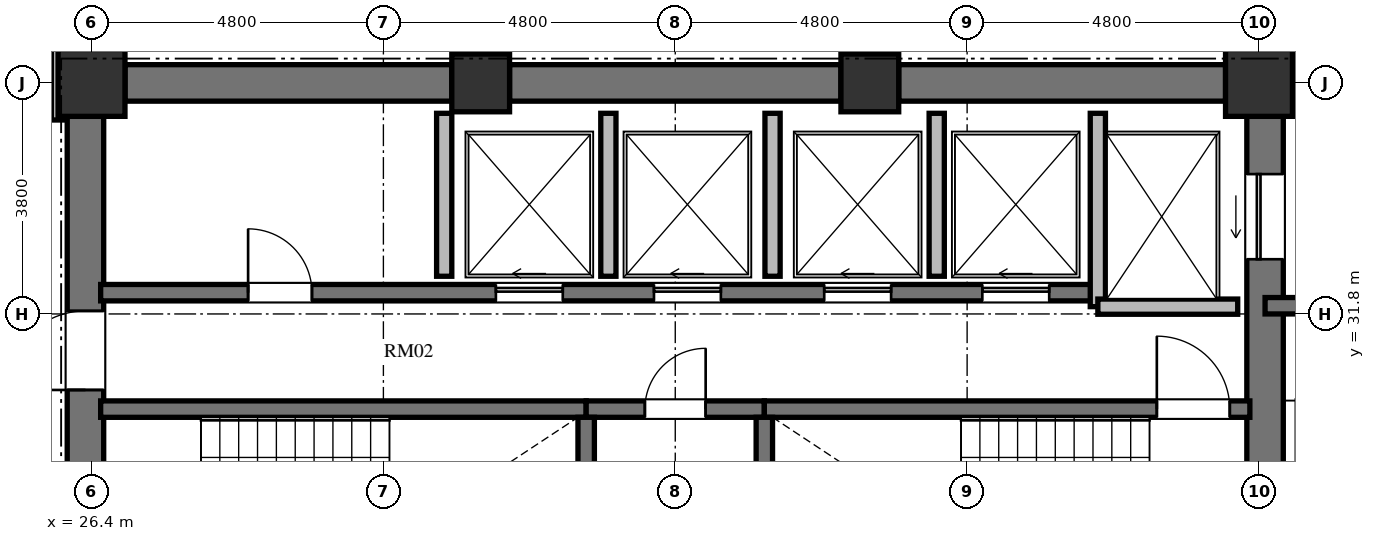
"""IFC4 building model, lengths in metres.
Left out: names, types, materials, properties, quantities, classifications, styles, units other than length and angle.
Written with IfcOpenShell. Run it as: python <this file> out.ifc"""

import sys

from ifc_helpers import new_model, si_unit, direction, frame, frame_2d, origin, origin_2d, place, context, subcontext, project, spatial, rectangle, extrude, element, fill, save


model = new_model("IFC4")
c1 = context("Model", 3, precision=1e-05, world=origin(), true_north=direction((0.0, 1.0)))
c2 = subcontext(c1, "Body", "Model", "MODEL_VIEW")
j1 = project(units=[si_unit("LENGTHUNIT", "METRE"), si_unit("PLANEANGLEUNIT", "RADIAN")], contexts=[c1])
p1 = place(None, origin())
s1 = spatial("IfcSite", under=j1, at=p1, CompositionType="ELEMENT")
p2 = place(p1, origin())
s2 = spatial("IfcBuilding", under=s1, at=p2, CompositionType="ELEMENT")
p3 = place(p2, frame((0.0, 0.0, 171.12)))
s3 = spatial("IfcBuildingStorey", under=s2, at=p3, CompositionType="ELEMENT", Elevation=171.12)
p4 = place(p3, frame((45.6, 35.6, 0.0), z_axis=(0.0, 0.0, 1.0), x_axis=(1.0, 0.0, 0.0)))
e1 = element("IfcColumn", 1, at=p4, inside=s3, PredefinedType="COLUMN", context=c2, shape_type="SweptSolid", body=[
    extrude(rectangle(XDim=1.1, YDim=1.1, at=origin_2d()), origin(), (0.0, 0.0, 1.0), 3.648),
])
for number, where, z_axis, x_axis in (
    (2, (39.2, 35.6, 0.0), (0.0, 0.0, 1.0), (1.0, 0.0, 0.0)),
    (3, (32.8, 35.6, 0.0), (0.0, 0.0, 1.0), (1.0, 0.0, 0.0)),
):
    element("IfcColumn", number, at=place(p3, frame(where, z_axis=z_axis, x_axis=x_axis)), inside=s3, PredefinedType="COLUMN", context=c2, shape_type="SweptSolid", body=[
        extrude(rectangle(XDim=0.95, YDim=0.95, at=origin_2d()), origin(), (0.0, 0.0, 1.0), 3.648),
    ])
p5 = place(p3, frame((26.4, 35.6, 0.0), z_axis=(0.0, 0.0, 1.0), x_axis=(1.0, 0.0, 0.0)))
e4 = element("IfcColumn", 4, at=p5, inside=s3, PredefinedType="COLUMN", context=c2, shape_type="SweptSolid", body=[
    extrude(rectangle(XDim=1.1, YDim=1.1, at=origin_2d()), origin(), (0.0, 0.0, 1.0), 3.648),
])
p6 = place(p3, frame((26.3, 20.95, 0.0), z_axis=(0.0, 0.0, 1.0), x_axis=(0.0, 1.0, 0.0)))
e5 = element("IfcWall", 5, at=p6, inside=s3, PredefinedType="SHEAR", context=c2, shape_type="SweptSolid", body=[
    extrude(rectangle(XDim=14.1, YDim=0.6, at=frame_2d((7.05, 0.0))), origin(), (0.0, 0.0, 1.0), 3.648),
])
p7 = place(p6, frame((6.5, 0.0, 0.0)))
e6 = element("IfcOpeningElement", 6, at=p7, cuts=e5, PredefinedType="OPENING", context=c2, shape_type="SweptSolid", body=[
    extrude(rectangle(XDim=1.2, YDim=2.15, at=frame_2d((0.6, 1.075))), frame((0.0, 0.31, 0.0), z_axis=(0.0, -1.0, 0.0), x_axis=(1.0, 0.0, 0.0)), (0.0, 0.0, 1.0), 0.62),
])
p8 = place(p6, frame((9.6, 0.0, 0.0)))
e7 = element("IfcOpeningElement", 7, at=p8, cuts=e5, PredefinedType="OPENING", context=c2, shape_type="SweptSolid", body=[
    extrude(rectangle(XDim=1.3, YDim=2.2, at=frame_2d((0.65, 1.1))), frame((0.0, 0.31, 0.0), z_axis=(0.0, -1.0, 0.0), x_axis=(1.0, 0.0, 0.0)), (0.0, 0.0, 1.0), 0.62),
])
p9 = place(p6, frame((3.26, 0.0, 0.0)))
e8 = element("IfcOpeningElement", 8, at=p9, cuts=e5, PredefinedType="OPENING", context=c2, shape_type="SweptSolid", body=[
    extrude(rectangle(XDim=1.3, YDim=2.2, at=frame_2d((0.65, 1.1))), frame((0.0, 0.31, 0.0), z_axis=(0.0, -1.0, 0.0), x_axis=(1.0, 0.0, 0.0)), (0.0, 0.0, 1.0), 0.62),
])
p10 = place(p3, frame((45.7, 20.95, 0.0), z_axis=(0.0, 0.0, 1.0), x_axis=(0.0, 1.0, 0.0)))
e9 = element("IfcWall", 9, at=p10, inside=s3, PredefinedType="SHEAR", context=c2, shape_type="SweptSolid", body=[
    extrude(rectangle(XDim=14.1, YDim=0.6, at=frame_2d((7.05, 0.0))), origin(), (0.0, 0.0, 1.0), 3.648),
])
p11 = place(p10, frame((11.75, 0.0, 0.0)))
e10 = element("IfcOpeningElement", 10, at=p11, cuts=e9, PredefinedType="OPENING", context=c2, shape_type="SweptSolid", body=[
    extrude(rectangle(XDim=1.4, YDim=2.3, at=frame_2d((0.7, 1.15))), frame((0.0, 0.31, 0.0), z_axis=(0.0, -1.0, 0.0), x_axis=(1.0, 0.0, 0.0)), (0.0, 0.0, 1.0), 0.62),
])
p12 = place(p10, frame((0.95, 0.0, 0.0)))
e11 = element("IfcOpeningElement", 11, at=p12, cuts=e9, PredefinedType="OPENING", context=c2, shape_type="SweptSolid", body=[
    extrude(rectangle(XDim=1.4, YDim=2.3, at=frame_2d((0.7, 1.15))), frame((0.0, 0.31, 0.0), z_axis=(0.0, -1.0, 0.0), x_axis=(1.0, 0.0, 0.0)), (0.0, 0.0, 1.0), 0.62),
])
p13 = place(p3, frame((26.95, 35.6, 0.0), z_axis=(0.0, 0.0, 1.0), x_axis=(1.0, 0.0, 0.0)))
e12 = element("IfcWall", 12, at=p13, inside=s3, PredefinedType="SHEAR", context=c2, shape_type="SweptSolid", body=[
    extrude(rectangle(XDim=5.375, YDim=0.6, at=frame_2d((2.688, 0.0))), origin(), (0.0, 0.0, 1.0), 3.648),
])
p14 = place(p3, frame((33.275, 35.6, 0.0), z_axis=(0.0, 0.0, 1.0), x_axis=(1.0, 0.0, 0.0)))
e13 = element("IfcWall", 13, at=p14, inside=s3, PredefinedType="SHEAR", context=c2, shape_type="SweptSolid", body=[
    extrude(rectangle(XDim=5.45, YDim=0.6, at=frame_2d((2.725, 0.0))), origin(), (0.0, 0.0, 1.0), 3.648),
])
p15 = place(p3, frame((39.675, 35.6, 0.0), z_axis=(0.0, 0.0, 1.0), x_axis=(1.0, 0.0, 0.0)))
e14 = element("IfcWall", 14, at=p15, inside=s3, PredefinedType="SHEAR", context=c2, shape_type="SweptSolid", body=[
    extrude(rectangle(XDim=5.375, YDim=0.6, at=frame_2d((2.688, 0.0))), origin(), (0.0, 0.0, 1.0), 3.648),
])
p16 = place(p3, frame((26.55, 30.235, 0.0), z_axis=(0.0, 0.0, 1.0), x_axis=(1.0, 0.0, 0.0)))
e15 = element("IfcWall", 15, at=p16, inside=s3, PredefinedType="SHEAR", context=c2, shape_type="SweptSolid", body=[
    extrude(rectangle(XDim=7.985, YDim=0.27, at=frame_2d((3.992, 0.0))), origin(), (0.0, 0.0, 1.0), 3.648),
])
p17 = place(p3, frame((34.535, 30.235, 0.0), z_axis=(0.0, 0.0, 1.0), x_axis=(1.0, 0.0, 0.0)))
e16 = element("IfcWall", 16, at=p17, inside=s3, PredefinedType="SHEAR", context=c2, shape_type="SweptSolid", body=[
    extrude(rectangle(XDim=2.93, YDim=0.27, at=frame_2d((1.465, 0.0))), origin(), (0.0, 0.0, 1.0), 3.648),
])
p18 = place(p17, frame((0.965, 0.0, 0.0)))
e17 = element("IfcOpeningElement", 17, at=p18, cuts=e16, PredefinedType="OPENING", context=c2, shape_type="SweptSolid", body=[
    extrude(rectangle(XDim=1.0, YDim=2.1, at=frame_2d((0.5, 1.05))), frame((0.0, 0.145, 0.0), z_axis=(0.0, -1.0, 0.0), x_axis=(1.0, 0.0, 0.0)), (0.0, 0.0, 1.0), 0.29),
])
p19 = place(p3, frame((37.465, 30.235, 0.0), z_axis=(0.0, 0.0, 1.0), x_axis=(1.0, 0.0, 0.0)))
e18 = element("IfcWall", 18, at=p19, inside=s3, PredefinedType="SHEAR", context=c2, shape_type="SweptSolid", body=[
    extrude(rectangle(XDim=7.985, YDim=0.27, at=frame_2d((3.992, 0.0))), origin(), (0.0, 0.0, 1.0), 3.648),
])
p20 = place(p19, frame((6.455, 0.0, 0.0)))
e19 = element("IfcOpeningElement", 19, at=p20, cuts=e18, PredefinedType="OPENING", context=c2, shape_type="SweptSolid", body=[
    extrude(rectangle(XDim=1.2, YDim=2.15, at=frame_2d((0.6, 1.075))), frame((0.0, 0.145, 0.0), z_axis=(0.0, -1.0, 0.0), x_axis=(1.0, 0.0, 0.0)), (0.0, 0.0, 1.0), 0.29),
])
for number, where, z_axis, x_axis in (
    (20, (34.535, 26.02, 0.0), (0.0, 0.0, 1.0), (0.0, 1.0, 0.0)),
    (21, (37.465, 26.02, 0.0), (0.0, 0.0, 1.0), (0.0, 1.0, 0.0)),
):
    element("IfcWall", number, at=place(p3, frame(where, z_axis=z_axis, x_axis=x_axis)), inside=s3, PredefinedType="SHEAR", context=c2, shape_type="SweptSolid", body=[
        extrude(rectangle(XDim=4.08, YDim=0.27, at=frame_2d((2.04, 0.0))), origin(), (0.0, 0.0, 1.0), 3.648),
    ])
p21 = place(p3, frame((26.55, 32.15, 0.0), z_axis=(0.0, 0.0, 1.0), x_axis=(1.0, 0.0, 0.0)))
e22 = element("IfcWall", 22, at=p21, inside=s3, PredefinedType="SHEAR", context=c2, shape_type="SweptSolid", body=[
    extrude(rectangle(XDim=16.4, YDim=0.27, at=frame_2d((8.2, 0.0))), origin(), (0.0, 0.0, 1.0), 3.648),
])
p22 = place(p21, frame((2.425, 0.0, 0.0)))
e23 = element("IfcOpeningElement", 23, at=p22, cuts=e22, PredefinedType="OPENING", context=c2, shape_type="SweptSolid", body=[
    extrude(rectangle(XDim=1.05, YDim=2.15, at=frame_2d((0.525, 1.075))), frame((0.0, 0.145, 0.0), z_axis=(0.0, -1.0, 0.0), x_axis=(1.0, 0.0, 0.0)), (0.0, 0.0, 1.0), 0.29),
])
p23 = place(p21, frame((6.5, 0.0, 0.0)))
e24 = element("IfcOpeningElement", 24, at=p23, cuts=e22, PredefinedType="OPENING", context=c2, shape_type="SweptSolid", body=[
    extrude(rectangle(XDim=1.1, YDim=2.2, at=frame_2d((0.55, 1.1))), frame((0.0, 0.145, 0.0), z_axis=(0.0, -1.0, 0.0), x_axis=(1.0, 0.0, 0.0)), (0.0, 0.0, 1.0), 0.29),
])
p24 = place(p21, frame((9.1, 0.0, 0.0)))
e25 = element("IfcOpeningElement", 25, at=p24, cuts=e22, PredefinedType="OPENING", context=c2, shape_type="SweptSolid", body=[
    extrude(rectangle(XDim=1.1, YDim=2.2, at=frame_2d((0.55, 1.1))), frame((0.0, 0.145, 0.0), z_axis=(0.0, -1.0, 0.0), x_axis=(1.0, 0.0, 0.0)), (0.0, 0.0, 1.0), 0.29),
])
p25 = place(p21, frame((11.9, 0.0, 0.0)))
e26 = element("IfcOpeningElement", 26, at=p25, cuts=e22, PredefinedType="OPENING", context=c2, shape_type="SweptSolid", body=[
    extrude(rectangle(XDim=1.1, YDim=2.2, at=frame_2d((0.55, 1.1))), frame((0.0, 0.145, 0.0), z_axis=(0.0, -1.0, 0.0), x_axis=(1.0, 0.0, 0.0)), (0.0, 0.0, 1.0), 0.29),
])
p26 = place(p21, frame((14.5, 0.0, 0.0)))
e27 = element("IfcOpeningElement", 27, at=p26, cuts=e22, PredefinedType="OPENING", context=c2, shape_type="SweptSolid", body=[
    extrude(rectangle(XDim=1.1, YDim=2.2, at=frame_2d((0.55, 1.1))), frame((0.0, 0.145, 0.0), z_axis=(0.0, -1.0, 0.0), x_axis=(1.0, 0.0, 0.0)), (0.0, 0.0, 1.0), 0.29),
])
p27 = place(p3, frame((42.95, 31.92, 0.0), z_axis=(0.0, 0.0, 1.0), x_axis=(0.0, 1.0, 0.0)))
e28 = element("IfcWall", 28, at=p27, inside=s3, PredefinedType="SOLIDWALL", context=c2, shape_type="SweptSolid", body=[
    extrude(rectangle(XDim=3.18, YDim=0.25, at=frame_2d((1.59, 0.0))), origin(), (0.0, 0.0, 1.0), 3.428),
])
p28 = place(p3, frame((42.95, 31.92, 0.0), z_axis=(0.0, 0.0, 1.0), x_axis=(1.0, 0.0, 0.0)))
e29 = element("IfcWall", 29, at=p28, inside=s3, PredefinedType="SOLIDWALL", context=c2, shape_type="SweptSolid", body=[
    extrude(rectangle(XDim=2.3, YDim=0.25, at=frame_2d((1.15, 0.0))), origin(), (0.0, 0.0, 1.0), 3.428),
])
for number, where, z_axis, x_axis in (
    (30, (32.2, 32.42, 0.0), (0.0, 0.0, 1.0), (0.0, 1.0, 0.0)),
    (31, (34.9, 32.42, 0.0), (0.0, 0.0, 1.0), (0.0, 1.0, 0.0)),
    (32, (37.6, 32.42, 0.0), (0.0, 0.0, 1.0), (0.0, 1.0, 0.0)),
    (33, (40.3, 32.42, 0.0), (0.0, 0.0, 1.0), (0.0, 1.0, 0.0)),
):
    element("IfcWall", number, at=place(p3, frame(where, z_axis=z_axis, x_axis=x_axis)), inside=s3, PredefinedType="SOLIDWALL", context=c2, shape_type="SweptSolid", body=[
        extrude(rectangle(XDim=2.68, YDim=0.25, at=frame_2d((1.34, 0.0))), origin(), (0.0, 0.0, 1.0), 3.428),
    ])
p29 = place(p3, frame((46.0, 35.98, 0.0), z_axis=(0.0, 0.0, 1.0), x_axis=(1.0, 0.0, 0.0)))
e34 = element("IfcWall", 34, at=p29, inside=s3, PredefinedType="SHEAR", context=c2, shape_type="SweptSolid", body=[
    extrude(rectangle(XDim=4.55, YDim=0.27, at=frame_2d((2.275, 0.0))), origin(), (0.0, 0.0, 1.0), 3.648),
])
p30 = place(p3, frame((45.7, 31.935, 0.0), z_axis=(0.0, 0.0, 1.0), x_axis=(1.0, 0.0, 0.0)))
e35 = element("IfcWall", 35, at=p30, inside=s3, PredefinedType="SHEAR", context=c2, shape_type="SweptSolid", body=[
    extrude(rectangle(XDim=4.715, YDim=0.27, at=frame_2d((2.357, 0.0))), origin(), (0.0, 0.0, 1.0), 3.648),
])
p31 = place(p3, frame((25.83, 36.21, 0.0), z_axis=(0.0, 0.0, 1.0), x_axis=(0.0, -1.0, 0.0)))
e36 = element("IfcWall", 36, at=p31, inside=s3, PredefinedType="PARTITIONING", context=c2, shape_type="SweptSolid", body=[
    extrude(rectangle(XDim=1.22, YDim=0.18, at=frame_2d((0.61, 0.0))), origin(), (0.0, 0.0, 1.0), 3.428),
])
p32 = place(p20, origin())
e37 = element("IfcDoor", 37, at=p32, inside=s3, OperationType="SINGLE_SWING_LEFT", PredefinedType="DOOR", context=c2, shape_type="SweptSolid", body=[
    extrude(rectangle(XDim=1.2, YDim=2.15, at=frame_2d((0.6, 1.075))), frame((0.0, 0.025, 0.0), z_axis=(0.0, -1.0, 0.0), x_axis=(1.0, 0.0, 0.0)), (0.0, 0.0, 1.0), 0.05),
])
fill(e19, e37)
p33 = place(p18, origin())
e38 = element("IfcDoor", 38, at=p33, inside=s3, OperationType="SINGLE_SWING_RIGHT", PredefinedType="DOOR", context=c2, shape_type="SweptSolid", body=[
    extrude(rectangle(XDim=1.0, YDim=2.1, at=frame_2d((0.5, 1.05))), frame((0.0, 0.025, 0.0), z_axis=(0.0, -1.0, 0.0), x_axis=(1.0, 0.0, 0.0)), (0.0, 0.0, 1.0), 0.05),
])
fill(e17, e38)
p34 = place(p8, origin())
e39 = element("IfcDoor", 39, at=p34, inside=s3, OperationType="SINGLE_SWING_LEFT", PredefinedType="DOOR", context=c2, shape_type="SweptSolid", body=[
    extrude(rectangle(XDim=1.3, YDim=2.2, at=frame_2d((0.65, 1.1))), frame((0.0, 0.025, 0.0), z_axis=(0.0, -1.0, 0.0), x_axis=(1.0, 0.0, 0.0)), (0.0, 0.0, 1.0), 0.05),
])
fill(e7, e39)
p35 = place(p22, origin())
e40 = element("IfcDoor", 40, at=p35, inside=s3, OperationType="SINGLE_SWING_LEFT", PredefinedType="DOOR", context=c2, shape_type="SweptSolid", body=[
    extrude(rectangle(XDim=1.05, YDim=2.15, at=frame_2d((0.525, 1.075))), frame((0.0, 0.025, 0.0), z_axis=(0.0, -1.0, 0.0), x_axis=(1.0, 0.0, 0.0)), (0.0, 0.0, 1.0), 0.05),
])
fill(e23, e40)
p36 = place(p23, origin())
e41 = element("IfcDoor", 41, at=p36, inside=s3, OperationType="SLIDING_TO_LEFT", PredefinedType="DOOR", context=c2, shape_type="SweptSolid", body=[
    extrude(rectangle(XDim=1.1, YDim=2.2, at=frame_2d((0.55, 1.1))), frame((0.0, 0.025, 0.0), z_axis=(0.0, -1.0, 0.0), x_axis=(1.0, 0.0, 0.0)), (0.0, 0.0, 1.0), 0.05),
])
fill(e24, e41)
p37 = place(p24, origin())
e42 = element("IfcDoor", 42, at=p37, inside=s3, OperationType="SLIDING_TO_LEFT", PredefinedType="DOOR", context=c2, shape_type="SweptSolid", body=[
    extrude(rectangle(XDim=1.1, YDim=2.2, at=frame_2d((0.55, 1.1))), frame((0.0, 0.025, 0.0), z_axis=(0.0, -1.0, 0.0), x_axis=(1.0, 0.0, 0.0)), (0.0, 0.0, 1.0), 0.05),
])
fill(e25, e42)
p38 = place(p25, origin())
e43 = element("IfcDoor", 43, at=p38, inside=s3, OperationType="SLIDING_TO_LEFT", PredefinedType="DOOR", context=c2, shape_type="SweptSolid", body=[
    extrude(rectangle(XDim=1.1, YDim=2.2, at=frame_2d((0.55, 1.1))), frame((0.0, 0.025, 0.0), z_axis=(0.0, -1.0, 0.0), x_axis=(1.0, 0.0, 0.0)), (0.0, 0.0, 1.0), 0.05),
])
fill(e26, e43)
p39 = place(p26, origin())
e44 = element("IfcDoor", 44, at=p39, inside=s3, OperationType="SLIDING_TO_LEFT", PredefinedType="DOOR", context=c2, shape_type="SweptSolid", body=[
    extrude(rectangle(XDim=1.1, YDim=2.2, at=frame_2d((0.55, 1.1))), frame((0.0, 0.025, 0.0), z_axis=(0.0, -1.0, 0.0), x_axis=(1.0, 0.0, 0.0)), (0.0, 0.0, 1.0), 0.05),
])
fill(e27, e44)
p40 = place(p11, origin())
e45 = element("IfcDoor", 45, at=p40, inside=s3, OperationType="SLIDING_TO_LEFT", PredefinedType="DOOR", context=c2, shape_type="SweptSolid", body=[
    extrude(rectangle(XDim=1.4, YDim=2.3, at=frame_2d((0.7, 1.15))), frame((0.0, 0.025, 0.0), z_axis=(0.0, -1.0, 0.0), x_axis=(1.0, 0.0, 0.0)), (0.0, 0.0, 1.0), 0.05),
])
fill(e10, e45)
save(model, sys.argv[1])
